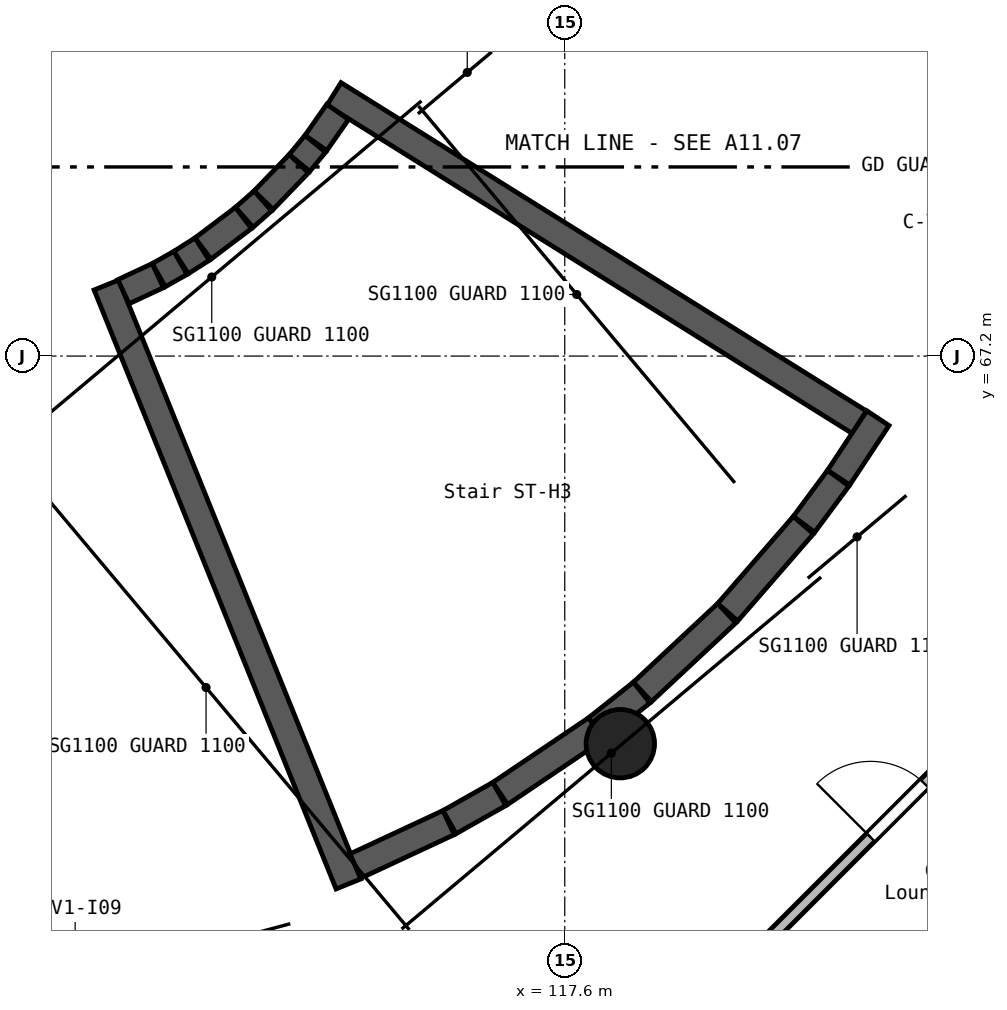
"""IFC4 building model, lengths in metres.
Left out: names, types, materials, properties, quantities, classifications, styles, units other than length and angle.
Written with IfcOpenShell. Run it as: python <this file> out.ifc"""

import sys

from ifc_helpers import new_model, si_unit, direction, frame, frame_2d, origin, origin_2d, place, context, subcontext, project, spatial, rectangle, circle, extrude, element, fill, save


model = new_model("IFC4")
c1 = context("Model", 3, precision=1e-05, world=origin(), true_north=direction((0.0, 1.0)))
c2 = subcontext(c1, "Body", "Model", "MODEL_VIEW")
j1 = project(units=[si_unit("LENGTHUNIT", "METRE"), si_unit("PLANEANGLEUNIT", "RADIAN")], contexts=[c1])
p1 = place(None, origin())
s1 = spatial("IfcSite", under=j1, at=p1, CompositionType="ELEMENT")
p2 = place(p1, origin())
s2 = spatial("IfcBuilding", under=s1, at=p2, CompositionType="ELEMENT")
p3 = place(p2, frame((0.0, 0.0, 5.4)))
s3 = spatial("IfcBuildingStorey", under=s2, at=p3, CompositionType="ELEMENT", Elevation=5.4)
p4 = place(p3, frame((118.331, 62.1, 0.0), z_axis=(0.0, 0.0, 1.0), x_axis=(1.0, 0.0, 0.0)))
e1 = element("IfcColumn", 1, at=p4, inside=s3, PredefinedType="COLUMN", context=c2, shape_type="SweptSolid", body=[
    extrude(circle(Radius=0.45, at=origin_2d()), origin(), (0.0, 0.0, 1.0), 4.5),
])
p5 = place(p3, frame((111.569, 68.135, 0.0), z_axis=(0.0, 0.0, 1.0), x_axis=(0.374642087999, -0.927169513034, 0.0)))
e2 = element("IfcWall", 2, at=p5, inside=s3, PredefinedType="SHEAR", context=c2, shape_type="SweptSolid", body=[
    extrude(rectangle(XDim=8.5, YDim=0.35, at=frame_2d((4.25, 0.0))), origin(), (0.0, 0.0, 1.0), 4.5),
])
p6 = place(p3, frame((112.246, 68.258, 0.0), z_axis=(0.0, 0.0, 1.0), x_axis=(-0.906320542705, -0.422590906043, 0.0)))
e3 = element("IfcWall", 3, at=p6, inside=s3, PredefinedType="SHEAR", context=c2, shape_type="SweptSolid", body=[
    extrude(rectangle(XDim=0.499, YDim=0.35, at=frame_2d((0.25, 0.0))), origin(), (0.0, 0.0, 1.0), 4.5),
])
for number, where, z_axis, x_axis in (
    (4, (112.258, 68.264, 0.0), (0.0, 0.0, 1.0), (0.871, 0.491, 0.0)),
    (5, (112.552, 68.43, 0.0), (0.0, 0.0, 1.0), (0.843, 0.538, 0.0)),
):
    element("IfcWall", number, at=place(p3, frame(where, z_axis=z_axis, x_axis=x_axis)), inside=s3, PredefinedType="SHEAR", context=c2, shape_type="SweptSolid", body=[
        extrude(rectangle(XDim=0.329, YDim=0.35, at=frame_2d((0.164, 0.0))), origin(), (0.0, 0.0, 1.0), 4.5),
    ])
p7 = place(p3, frame((113.373, 69.017, 0.0), z_axis=(0.0, 0.0, 1.0), x_axis=(-0.7979299439, -0.602750200853, 0.0)))
e6 = element("IfcWall", 6, at=p7, inside=s3, PredefinedType="SHEAR", context=c2, shape_type="SweptSolid", body=[
    extrude(rectangle(XDim=0.667, YDim=0.35, at=frame_2d((0.333, 0.0))), origin(), (0.0, 0.0, 1.0), 4.5),
])
p8 = place(p3, frame((113.383, 69.025, 0.0), z_axis=(0.0, 0.0, 1.0), x_axis=(0.749510325372, 0.661992652649, 0.0)))
e7 = element("IfcWall", 7, at=p8, inside=s3, PredefinedType="SHEAR", context=c2, shape_type="SweptSolid", body=[
    extrude(rectangle(XDim=0.326, YDim=0.35, at=frame_2d((0.163, 0.0))), origin(), (0.0, 0.0, 1.0), 4.5),
])
p9 = place(p3, frame((114.101, 69.731, 0.0), z_axis=(0.0, 0.0, 1.0), x_axis=(-0.694555328872, -0.719439292182, 0.0)))
e8 = element("IfcWall", 8, at=p9, inside=s3, PredefinedType="SHEAR", context=c2, shape_type="SweptSolid", body=[
    extrude(rectangle(XDim=0.667, YDim=0.35, at=frame_2d((0.333, 0.0))), origin(), (0.0, 0.0, 1.0), 4.5),
])
p10 = place(p3, frame((114.11, 69.741, 0.0), z_axis=(0.0, 0.0, 1.0), x_axis=(0.636048566806, 0.771649026867, 0.0)))
e9 = element("IfcWall", 9, at=p10, inside=s3, PredefinedType="SHEAR", context=c2, shape_type="SweptSolid", body=[
    extrude(rectangle(XDim=0.326, YDim=0.35, at=frame_2d((0.163, 0.0))), origin(), (0.0, 0.0, 1.0), 4.5),
])
p11 = place(p3, frame((114.563, 70.649, 0.0), z_axis=(0.0, 0.0, 1.0), x_axis=(0.848065610157, -0.529891234942, 0.0)))
e10 = element("IfcWall", 10, at=p11, inside=s3, PredefinedType="SHEAR", context=c2, shape_type="SweptSolid", body=[
    extrude(rectangle(XDim=8.15, YDim=0.35, at=frame_2d((4.075, 0.0))), origin(), (0.0, 0.0, 1.0), 4.5),
])
p12 = place(p3, frame((114.612, 70.413, 0.0), z_axis=(0.0, 0.0, 1.0), x_axis=(-0.572969657361, -0.819576580768, 0.0)))
e11 = element("IfcWall", 11, at=p12, inside=s3, PredefinedType="SHEAR", context=c2, shape_type="SweptSolid", body=[
    extrude(rectangle(XDim=0.499, YDim=0.35, at=frame_2d((0.25, 0.0))), origin(), (0.0, 0.0, 1.0), 4.5),
])
p13 = place(p3, frame((114.847, 60.491, 0.0), z_axis=(0.0, 0.0, 1.0), x_axis=(0.906372243269, 0.422480007375, 0.0)))
e12 = element("IfcWall", 12, at=p13, inside=s3, PredefinedType="SHEAR", context=c2, shape_type="SweptSolid", body=[
    extrude(rectangle(XDim=1.352, YDim=0.35, at=frame_2d((0.676, 0.0))), origin(), (0.0, 0.0, 1.0), 4.5),
])
p14 = place(p3, frame((116.084, 61.068, 0.0), z_axis=(0.0, 0.0, 1.0), x_axis=(0.870629311114, 0.491939633115, 0.0)))
e13 = element("IfcWall", 13, at=p14, inside=s3, PredefinedType="SHEAR", context=c2, shape_type="SweptSolid", body=[
    extrude(rectangle(XDim=0.752, YDim=0.35, at=frame_2d((0.376, 0.0))), origin(), (0.0, 0.0, 1.0), 4.5),
])
p15 = place(p3, frame((116.751, 61.446, 0.0), z_axis=(0.0, 0.0, 1.0), x_axis=(0.828999419692, 0.559249463255, 0.0)))
e14 = element("IfcWall", 14, at=p15, inside=s3, PredefinedType="SHEAR", context=c2, shape_type="SweptSolid", body=[
    extrude(rectangle(XDim=1.521, YDim=0.35, at=frame_2d((0.76, 0.0))), origin(), (0.0, 0.0, 1.0), 4.5),
])
p16 = place(p3, frame((118.022, 62.304, 0.0), z_axis=(0.0, 0.0, 1.0), x_axis=(0.78266928619, 0.622437778781, 0.0)))
e15 = element("IfcWall", 15, at=p16, inside=s3, PredefinedType="SHEAR", context=c2, shape_type="SweptSolid", body=[
    extrude(rectangle(XDim=0.753, YDim=0.35, at=frame_2d((0.376, 0.0))), origin(), (0.0, 0.0, 1.0), 4.5),
])
p17 = place(p3, frame((118.622, 62.782, 0.0), z_axis=(0.0, 0.0, 1.0), x_axis=(0.731146243932, 0.682220763378, 0.0)))
e16 = element("IfcWall", 16, at=p17, inside=s3, PredefinedType="SHEAR", context=c2, shape_type="SweptSolid", body=[
    extrude(rectangle(XDim=1.517, YDim=0.35, at=frame_2d((0.759, 0.0))), origin(), (0.0, 0.0, 1.0), 4.5),
])
p18 = place(p3, frame((119.744, 63.83, 0.0), z_axis=(0.0, 0.0, 1.0), x_axis=(0.655836227658, 0.754903200742, 0.0)))
e17 = element("IfcWall", 17, at=p18, inside=s3, PredefinedType="SHEAR", context=c2, shape_type="SweptSolid", body=[
    extrude(rectangle(XDim=1.518, YDim=0.35, at=frame_2d((0.759, 0.0))), origin(), (0.0, 0.0, 1.0), 4.5),
])
p19 = place(p3, frame((120.748, 64.986, 0.0), z_axis=(0.0, 0.0, 1.0), x_axis=(0.595752815961, 0.803167841908, 0.0)))
e18 = element("IfcWall", 18, at=p19, inside=s3, PredefinedType="SHEAR", context=c2, shape_type="SweptSolid", body=[
    extrude(rectangle(XDim=0.756, YDim=0.35, at=frame_2d((0.378, 0.0))), origin(), (0.0, 0.0, 1.0), 4.5),
])
p20 = place(p3, frame((121.204, 65.601, 0.0), z_axis=(0.0, 0.0, 1.0), x_axis=(0.551390002526, 0.8342476042, 0.0)))
e19 = element("IfcWall", 19, at=p20, inside=s3, PredefinedType="SHEAR", context=c2, shape_type="SweptSolid", body=[
    extrude(rectangle(XDim=0.937, YDim=0.35, at=frame_2d((0.469, 0.0))), origin(), (0.0, 0.0, 1.0), 4.5),
])
p21 = place(p3, frame((120.243, 59.486, 0.0), z_axis=(0.0, 0.0, 1.0), x_axis=(0.707131648229, 0.70708191327, 0.0)))
e20 = element("IfcWall", 20, at=p21, inside=s3, PredefinedType="PARTITIONING", context=c2, shape_type="SweptSolid", body=[
    extrude(rectangle(XDim=4.909, YDim=0.15, at=frame_2d((2.455, 0.0))), origin(), (0.0, 0.0, 1.0), 4.15),
])
p22 = place(p21, frame((1.954, 0.0, 0.0)))
e21 = element("IfcOpeningElement", 21, at=p22, cuts=e20, PredefinedType="OPENING", context=c2, shape_type="SweptSolid", body=[
    extrude(rectangle(XDim=1.0, YDim=2.1, at=frame_2d((0.5, 1.05))), frame((0.0, 0.085, 0.0), z_axis=(0.0, -1.0, 0.0), x_axis=(1.0, 0.0, 0.0)), (0.0, 0.0, 1.0), 0.17),
])
p23 = place(p22, frame((1.0, 0.0, 0.0), z_axis=(0.0, 0.0, 1.0), x_axis=(-1.0, 0.0, 0.0)))
e22 = element("IfcDoor", 22, at=p23, inside=s3, OperationType="SINGLE_SWING_LEFT", PredefinedType="DOOR", context=c2, shape_type="SweptSolid", body=[
    extrude(rectangle(XDim=1.0, YDim=2.1, at=frame_2d((0.5, 1.05))), frame((0.0, 0.025, 0.0), z_axis=(0.0, -1.0, 0.0), x_axis=(1.0, 0.0, 0.0)), (0.0, 0.0, 1.0), 0.05),
])
fill(e21, e22)
save(model, sys.argv[1])
